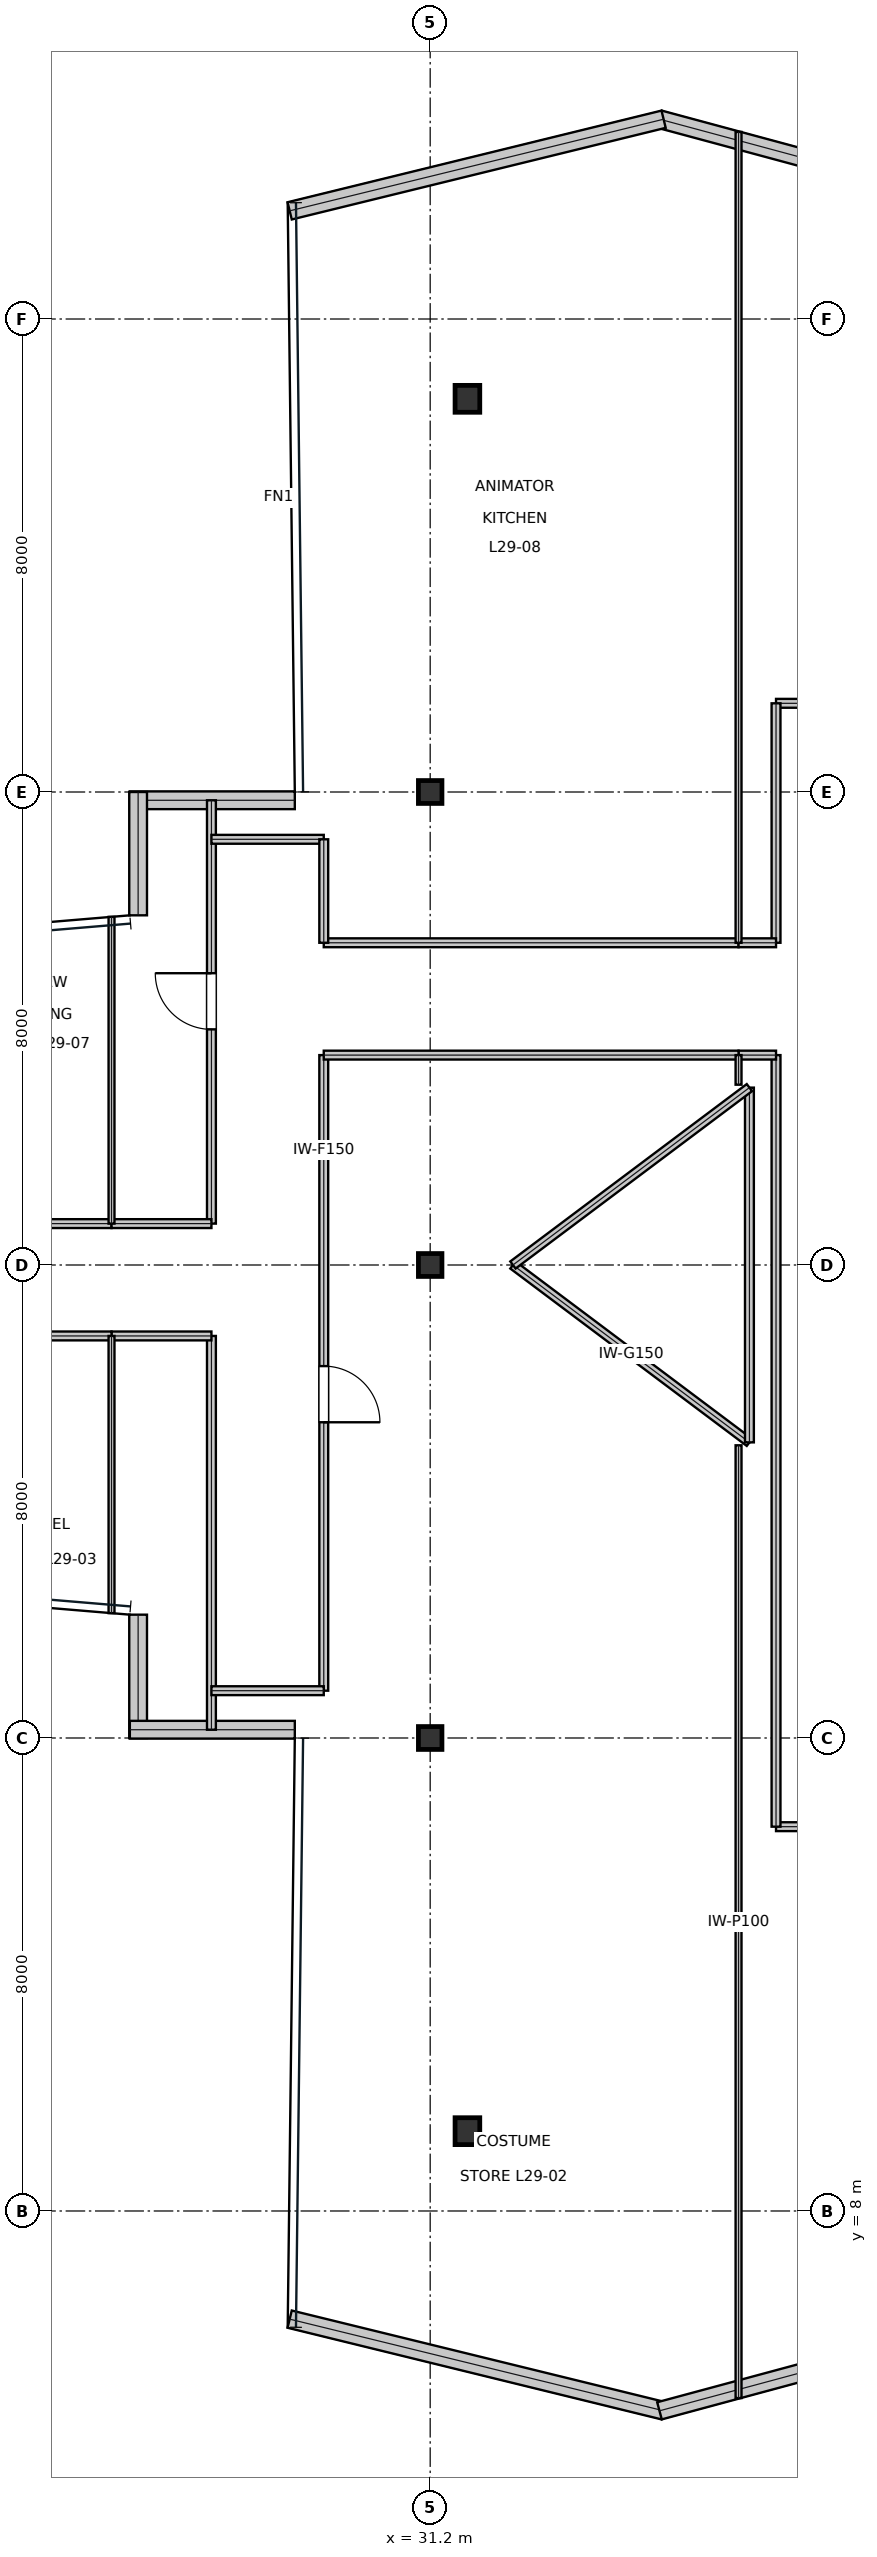
"""IFC4 building model, lengths in metres.
Left out: names, types, materials, properties, quantities, classifications, styles, units other than length and angle.
Written with IfcOpenShell. Run it as: python <this file> out.ifc"""

import sys

from ifc_helpers import new_model, si_unit, direction, frame, frame_2d, origin, origin_2d, place, context, subcontext, project, spatial, rectangle, i_section, extrude, element, fill, save


model = new_model("IFC4")
c1 = context("Model", 3, precision=1e-05, world=origin(), true_north=direction((0.0, 1.0)))
c2 = subcontext(c1, "Body", "Model", "MODEL_VIEW")
j1 = project(units=[si_unit("LENGTHUNIT", "METRE"), si_unit("PLANEANGLEUNIT", "RADIAN")], contexts=[c1])
p1 = place(None, origin())
s1 = spatial("IfcSite", under=j1, at=p1, CompositionType="ELEMENT")
p2 = place(p1, origin())
s2 = spatial("IfcBuilding", under=s1, at=p2, CompositionType="ELEMENT")
p3 = place(p2, frame((0.0, 0.0, 129.0)))
s3 = spatial("IfcBuildingStorey", under=s2, at=p3, CompositionType="ELEMENT", Elevation=129.0)
for number, where, z_axis, x_axis in (
    (1, (31.2, 16.0, 0.0), (0.0, 0.0, 1.0), (1.0, 0.0, 0.0)),
    (2, (31.2, 24.0, 0.0), (0.0, 0.0, 1.0), (1.0, 0.0, 0.0)),
    (3, (31.2, 32.0, 0.0), (0.0, 0.0, 1.0), (1.0, 0.0, 0.0)),
):
    element("IfcColumn", number, at=place(p3, frame(where, z_axis=z_axis, x_axis=x_axis)), inside=s3, PredefinedType="COLUMN", context=c2, shape_type="SweptSolid", body=[
        extrude(i_section(OverallWidth=0.398, OverallDepth=0.387, WebThickness=0.021, FlangeThickness=0.033, at=origin_2d()), origin(), (0.0, 0.0, 1.0), 4.044),
    ])
for number, where, z_axis, x_axis in (
    (4, (31.83, 38.65, 0.016), (0.0, 0.0, 1.0), (1.0, 0.0, 0.0)),
    (5, (31.83, 9.35, 0.016), (0.0, 0.0, 1.0), (1.0, 0.0, 0.0)),
):
    element("IfcColumn", number, at=place(p3, frame(where, z_axis=z_axis, x_axis=x_axis)), inside=s3, PredefinedType="COLUMN", context=c2, shape_type="SweptSolid", body=[
        extrude(i_section(OverallWidth=0.418, OverallDepth=0.455, WebThickness=0.042, FlangeThickness=0.068, at=origin_2d()), origin(), (0.0, 0.0, 1.0), 4.018),
    ])
p4 = place(p3, frame((41.404, 41.675, 0.0), z_axis=(0.0, 0.0, 1.0), x_axis=(-0.965531145086, 0.260287548434, 0.0)))
e6 = element("IfcWall", 6, at=p4, inside=s3, PredefinedType="STANDARD", context=c2, shape_type="SweptSolid", body=[
    extrude(rectangle(XDim=6.551, YDim=0.3, at=frame_2d((3.275, 0.0))), origin(), (0.0, 0.0, 1.0), 3.81),
])
p5 = place(p3, frame((35.148, 43.379, 0.0), z_axis=(0.0, 0.0, 1.0), x_axis=(-0.971267606245, -0.23798999361, 0.0)))
e7 = element("IfcWall", 7, at=p5, inside=s3, PredefinedType="STANDARD", context=c2, shape_type="SweptSolid", body=[
    extrude(rectangle(XDim=6.512, YDim=0.3, at=frame_2d((3.256, 0.0))), origin(), (0.0, 0.0, 1.0), 3.81),
])
p6 = place(p3, frame((28.91, 31.86, 0.0), z_axis=(0.0, 0.0, 1.0), x_axis=(-1.0, 0.0, 0.0)))
e8 = element("IfcWall", 8, at=p6, inside=s3, PredefinedType="STANDARD", context=c2, shape_type="SweptSolid", body=[
    extrude(rectangle(XDim=2.79, YDim=0.3, at=frame_2d((1.395, 0.0))), origin(), (0.0, 0.0, 1.0), 3.81),
])
for number, where, z_axis, x_axis in (
    (9, (26.26, 32.0, 0.0), (0.0, 0.0, 1.0), (0.0, -1.0, 0.0)),
    (10, (26.26, 18.086, 0.0), (0.0, 0.0, 1.0), (0.0, -1.0, 0.0)),
):
    element("IfcWall", number, at=place(p3, frame(where, z_axis=z_axis, x_axis=x_axis)), inside=s3, PredefinedType="STANDARD", context=c2, shape_type="SweptSolid", body=[
        extrude(rectangle(XDim=2.086, YDim=0.3, at=frame_2d((1.043, 0.0))), origin(), (0.0, 0.0, 1.0), 3.338),
    ])
p7 = place(p3, frame((26.12, 16.14, 0.0), z_axis=(0.0, 0.0, 1.0), x_axis=(1.0, 0.0, 0.0)))
e11 = element("IfcWall", 11, at=p7, inside=s3, PredefinedType="STANDARD", context=c2, shape_type="SweptSolid", body=[
    extrude(rectangle(XDim=2.79, YDim=0.3, at=frame_2d((1.395, 0.0))), origin(), (0.0, 0.0, 1.0), 3.81),
])
p8 = place(p3, frame((28.823, 6.171, 0.0), z_axis=(0.0, 0.0, 1.0), x_axis=(0.971267606245, -0.23798999361, 0.0)))
e12 = element("IfcWall", 12, at=p8, inside=s3, PredefinedType="STANDARD", context=c2, shape_type="SweptSolid", body=[
    extrude(rectangle(XDim=6.512, YDim=0.3, at=frame_2d((3.256, 0.0))), origin(), (0.0, 0.0, 1.0), 3.81),
])
p9 = place(p3, frame((35.079, 4.62, 0.0), z_axis=(0.0, 0.0, 1.0), x_axis=(0.965531145086, 0.260287548434, 0.0)))
e13 = element("IfcWall", 13, at=p9, inside=s3, PredefinedType="STANDARD", context=c2, shape_type="SweptSolid", body=[
    extrude(rectangle(XDim=6.551, YDim=0.3, at=frame_2d((3.275, 0.0))), origin(), (0.0, 0.0, 1.0), 3.81),
])
p10 = place(p3, frame((37.05, 14.5, 0.0), z_axis=(0.0, 0.0, 1.0), x_axis=(1.0, 0.0, 0.0)))
e14 = element("IfcWall", 14, at=p10, inside=s3, PredefinedType="PARTITIONING", context=c2, shape_type="SweptSolid", body=[
    extrude(rectangle(XDim=1.9, YDim=0.15, at=frame_2d((0.95, 0.0))), origin(), (0.0, 0.0, 1.0), 3.19),
])
p11 = place(p10, frame((0.475, 0.0, 0.0)))
e15 = element("IfcOpeningElement", 15, at=p11, cuts=e14, PredefinedType="OPENING", context=c2, shape_type="SweptSolid", body=[
    extrude(rectangle(XDim=0.95, YDim=2.15, at=frame_2d((0.475, 1.075))), frame((0.0, 0.085, 0.0), z_axis=(0.0, -1.0, 0.0), x_axis=(1.0, 0.0, 0.0)), (0.0, 0.0, 1.0), 0.17),
])
p12 = place(p3, frame((29.4, 16.8, 0.0), z_axis=(0.0, 0.0, 1.0), x_axis=(0.0, 1.0, 0.0)))
e16 = element("IfcWall", 16, at=p12, inside=s3, PredefinedType="PARTITIONING", context=c2, shape_type="SweptSolid", body=[
    extrude(rectangle(XDim=10.75, YDim=0.15, at=frame_2d((5.375, 0.0))), origin(), (0.0, 0.0, 1.0), 3.19),
])
p13 = place(p12, frame((4.54, 0.0, 0.0)))
e17 = element("IfcOpeningElement", 17, at=p13, cuts=e16, PredefinedType="OPENING", context=c2, shape_type="SweptSolid", body=[
    extrude(rectangle(XDim=0.95, YDim=2.15, at=frame_2d((0.475, 1.075))), frame((0.0, 0.085, 0.0), z_axis=(0.0, -1.0, 0.0), x_axis=(1.0, 0.0, 0.0)), (0.0, 0.0, 1.0), 0.17),
])
p14 = place(p3, frame((27.5, 24.7, 0.0), z_axis=(0.0, 0.0, 1.0), x_axis=(0.0, 1.0, 0.0)))
e18 = element("IfcWall", 18, at=p14, inside=s3, PredefinedType="PARTITIONING", context=c2, shape_type="SweptSolid", body=[
    extrude(rectangle(XDim=7.16, YDim=0.15, at=frame_2d((3.58, 0.0))), origin(), (0.0, 0.0, 1.0), 3.338),
])
p15 = place(p14, frame((3.285, 0.0, 0.0)))
e19 = element("IfcOpeningElement", 19, at=p15, cuts=e18, PredefinedType="OPENING", context=c2, shape_type="SweptSolid", body=[
    extrude(rectangle(XDim=0.95, YDim=2.15, at=frame_2d((0.475, 1.075))), frame((0.0, 0.085, 0.0), z_axis=(0.0, -1.0, 0.0), x_axis=(1.0, 0.0, 0.0)), (0.0, 0.0, 1.0), 0.17),
])
p16 = place(p3, frame((37.05, 33.5, 0.0), z_axis=(0.0, 0.0, 1.0), x_axis=(1.0, 0.0, 0.0)))
e20 = element("IfcWall", 20, at=p16, inside=s3, PredefinedType="PARTITIONING", context=c2, shape_type="SweptSolid", body=[
    extrude(rectangle(XDim=1.9, YDim=0.15, at=frame_2d((0.95, 0.0))), origin(), (0.0, 0.0, 1.0), 3.19),
])
p17 = place(p16, frame((0.475, 0.0, 0.0)))
e21 = element("IfcOpeningElement", 21, at=p17, cuts=e20, PredefinedType="OPENING", context=c2, shape_type="SweptSolid", body=[
    extrude(rectangle(XDim=0.95, YDim=2.15, at=frame_2d((0.475, 1.075))), frame((0.0, 0.085, 0.0), z_axis=(0.0, -1.0, 0.0), x_axis=(1.0, 0.0, 0.0)), (0.0, 0.0, 1.0), 0.17),
])
p18 = place(p3, frame((37.05, 14.5, 0.0), z_axis=(0.0, 0.0, 1.0), x_axis=(0.0, 1.0, 0.0)))
e22 = element("IfcWall", 22, at=p18, inside=s3, PredefinedType="PARTITIONING", context=c2, shape_type="SweptSolid", body=[
    extrude(rectangle(XDim=13.05, YDim=0.15, at=frame_2d((6.525, 0.0))), origin(), (0.0, 0.0, 1.0), 3.19),
])
p19 = place(p3, frame((36.416, 27.55, 0.0), z_axis=(0.0, 0.0, 1.0), x_axis=(1.0, 0.0, 0.0)))
e23 = element("IfcWall", 23, at=p19, inside=s3, PredefinedType="PARTITIONING", context=c2, shape_type="SweptSolid", body=[
    extrude(rectangle(XDim=0.634, YDim=0.15, at=frame_2d((0.317, 0.0))), origin(), (0.0, 0.0, 1.0), 3.443),
])
p20 = place(p3, frame((29.4, 27.55, 0.0), z_axis=(0.0, 0.0, 1.0), x_axis=(1.0, 0.0, 0.0)))
e24 = element("IfcWall", 24, at=p20, inside=s3, PredefinedType="PARTITIONING", context=c2, shape_type="SweptSolid", body=[
    extrude(rectangle(XDim=7.016, YDim=0.15, at=frame_2d((3.508, 0.0))), origin(), (0.0, 0.0, 1.0), 3.19),
])
p21 = place(p3, frame((27.5, 16.14, 0.0), z_axis=(0.0, 0.0, 1.0), x_axis=(0.0, 1.0, 0.0)))
e25 = element("IfcWall", 25, at=p21, inside=s3, PredefinedType="PARTITIONING", context=c2, shape_type="SweptSolid", body=[
    extrude(rectangle(XDim=6.66, YDim=0.15, at=frame_2d((3.33, 0.0))), origin(), (0.0, 0.0, 1.0), 3.338),
])
p22 = place(p3, frame((27.5, 16.8, 0.0), z_axis=(0.0, 0.0, 1.0), x_axis=(1.0, 0.0, 0.0)))
e26 = element("IfcWall", 26, at=p22, inside=s3, PredefinedType="PARTITIONING", context=c2, shape_type="SweptSolid", body=[
    extrude(rectangle(XDim=1.9, YDim=0.15, at=frame_2d((0.95, 0.0))), origin(), (0.0, 0.0, 1.0), 3.338),
])
p23 = place(p3, frame((25.81, 22.8, 0.0), z_axis=(0.0, 0.0, 1.0), x_axis=(1.0, 0.0, 0.0)))
e27 = element("IfcWall", 27, at=p23, inside=s3, PredefinedType="PARTITIONING", context=c2, shape_type="SweptSolid", body=[
    extrude(rectangle(XDim=1.69, YDim=0.15, at=frame_2d((0.845, 0.0))), origin(), (0.0, 0.0, 1.0), 3.81),
])
for number, where, z_axis, x_axis in (
    (28, (23.1, 22.8, 0.0), (0.0, 0.0, 1.0), (1.0, 0.0, 0.0)),
    (29, (23.1, 24.7, 0.0), (0.0, 0.0, 1.0), (1.0, 0.0, 0.0)),
):
    element("IfcWall", number, at=place(p3, frame(where, z_axis=z_axis, x_axis=x_axis)), inside=s3, PredefinedType="PARTITIONING", context=c2, shape_type="SweptSolid", body=[
        extrude(rectangle(XDim=2.71, YDim=0.15, at=frame_2d((1.355, 0.0))), origin(), (0.0, 0.0, 1.0), 3.19),
    ])
p24 = place(p3, frame((29.4, 29.45, 0.0), z_axis=(0.0, 0.0, 1.0), x_axis=(1.0, 0.0, 0.0)))
e30 = element("IfcWall", 30, at=p24, inside=s3, PredefinedType="PARTITIONING", context=c2, shape_type="SweptSolid", body=[
    extrude(rectangle(XDim=7.016, YDim=0.15, at=frame_2d((3.508, 0.0))), origin(), (0.0, 0.0, 1.0), 3.19),
])
p25 = place(p3, frame((27.5, 31.2, 0.0), z_axis=(0.0, 0.0, 1.0), x_axis=(1.0, 0.0, 0.0)))
e31 = element("IfcWall", 31, at=p25, inside=s3, PredefinedType="PARTITIONING", context=c2, shape_type="SweptSolid", body=[
    extrude(rectangle(XDim=1.9, YDim=0.15, at=frame_2d((0.95, 0.0))), origin(), (0.0, 0.0, 1.0), 3.338),
])
p26 = place(p3, frame((29.4, 29.45, 0.0), z_axis=(0.0, 0.0, 1.0), x_axis=(0.0, 1.0, 0.0)))
e32 = element("IfcWall", 32, at=p26, inside=s3, PredefinedType="PARTITIONING", context=c2, shape_type="SweptSolid", body=[
    extrude(rectangle(XDim=1.75, YDim=0.15, at=frame_2d((0.875, 0.0))), origin(), (0.0, 0.0, 1.0), 3.81),
])
p27 = place(p3, frame((25.81, 24.7, 0.0), z_axis=(0.0, 0.0, 1.0), x_axis=(1.0, 0.0, 0.0)))
e33 = element("IfcWall", 33, at=p27, inside=s3, PredefinedType="PARTITIONING", context=c2, shape_type="SweptSolid", body=[
    extrude(rectangle(XDim=1.69, YDim=0.15, at=frame_2d((0.845, 0.0))), origin(), (0.0, 0.0, 1.0), 3.19),
])
p28 = place(p3, frame((37.05, 29.45, 0.0), z_axis=(0.0, 0.0, 1.0), x_axis=(0.0, 1.0, 0.0)))
e34 = element("IfcWall", 34, at=p28, inside=s3, PredefinedType="PARTITIONING", context=c2, shape_type="SweptSolid", body=[
    extrude(rectangle(XDim=4.05, YDim=0.15, at=frame_2d((2.025, 0.0))), origin(), (0.0, 0.0, 1.0), 3.19),
])
p29 = place(p3, frame((36.416, 29.45, 0.0), z_axis=(0.0, 0.0, 1.0), x_axis=(1.0, 0.0, 0.0)))
e35 = element("IfcWall", 35, at=p29, inside=s3, PredefinedType="PARTITIONING", context=c2, shape_type="SweptSolid", body=[
    extrude(rectangle(XDim=0.634, YDim=0.15, at=frame_2d((0.317, 0.0))), origin(), (0.0, 0.0, 1.0), 3.81),
])
p30 = place(p3, frame((36.416, 4.836, 0.0), z_axis=(0.0, 0.0, 1.0), x_axis=(0.0, 1.0, 0.0)))
e36 = element("IfcWall", 36, at=p30, inside=s3, PredefinedType="PARTITIONING", context=c2, shape_type="SweptSolid", body=[
    extrude(rectangle(XDim=16.115, YDim=0.1, at=frame_2d((8.057, 0.0))), origin(), (0.0, 0.0, 1.0), 3.19),
])
p31 = place(p3, frame((36.416, 27.05, 0.0), z_axis=(0.0, 0.0, 1.0), x_axis=(0.0, 1.0, 0.0)))
e37 = element("IfcWall", 37, at=p31, inside=s3, PredefinedType="PARTITIONING", context=c2, shape_type="SweptSolid", body=[
    extrude(rectangle(XDim=0.5, YDim=0.1, at=frame_2d((0.25, 0.0))), origin(), (0.0, 0.0, 1.0), 3.81),
])
p32 = place(p3, frame((25.81, 18.112, 0.0), z_axis=(0.0, 0.0, 1.0), x_axis=(0.0, 1.0, 0.0)))
e38 = element("IfcWall", 38, at=p32, inside=s3, PredefinedType="PARTITIONING", context=c2, shape_type="SweptSolid", body=[
    extrude(rectangle(XDim=4.688, YDim=0.1, at=frame_2d((2.344, 0.0))), origin(), (0.0, 0.0, 1.0), 3.81),
])
p33 = place(p3, frame((25.81, 24.7, 0.0), z_axis=(0.0, 0.0, 1.0), x_axis=(0.0, 1.0, 0.0)))
e39 = element("IfcWall", 39, at=p33, inside=s3, PredefinedType="PARTITIONING", context=c2, shape_type="SweptSolid", body=[
    extrude(rectangle(XDim=5.188, YDim=0.1, at=frame_2d((2.594, 0.0))), origin(), (0.0, 0.0, 1.0), 3.19),
])
p34 = place(p3, frame((36.416, 29.45, 0.0), z_axis=(0.0, 0.0, 1.0), x_axis=(0.0, 1.0, 0.0)))
e40 = element("IfcWall", 40, at=p34, inside=s3, PredefinedType="PARTITIONING", context=c2, shape_type="SweptSolid", body=[
    extrude(rectangle(XDim=13.714, YDim=0.1, at=frame_2d((6.857, 0.0))), origin(), (0.0, 0.0, 1.0), 3.19),
])
p35 = place(p3, frame((32.6, 24.0, 0.0), z_axis=(0.0, 0.0, 1.0), x_axis=(0.8, -0.6, 0.0)))
e41 = element("IfcWall", 41, at=p35, inside=s3, PredefinedType="MOVABLE", context=c2, shape_type="SweptSolid", body=[
    extrude(rectangle(XDim=5.0, YDim=0.15, at=frame_2d((2.5, 0.0))), origin(), (0.0, 0.0, 1.0), 3.81),
])
p36 = place(p3, frame((36.6, 21.0, 0.0), z_axis=(0.0, 0.0, 1.0), x_axis=(0.0, 1.0, 0.0)))
e42 = element("IfcWall", 42, at=p36, inside=s3, PredefinedType="MOVABLE", context=c2, shape_type="SweptSolid", body=[
    extrude(rectangle(XDim=6.0, YDim=0.15, at=frame_2d((3.0, 0.0))), origin(), (0.0, 0.0, 1.0), 3.81),
])
p37 = place(p3, frame((36.6, 27.0, 0.0), z_axis=(0.0, 0.0, 1.0), x_axis=(-0.8, -0.6, 0.0)))
e43 = element("IfcWall", 43, at=p37, inside=s3, PredefinedType="MOVABLE", context=c2, shape_type="SweptSolid", body=[
    extrude(rectangle(XDim=5.0, YDim=0.15, at=frame_2d((2.5, 0.0))), origin(), (0.0, 0.0, 1.0), 3.81),
])
p38 = place(p13, frame((0.95, 0.0, 0.0), z_axis=(0.0, 0.0, 1.0), x_axis=(-1.0, 0.0, 0.0)))
e44 = element("IfcDoor", 44, at=p38, inside=s3, OperationType="SINGLE_SWING_RIGHT", PredefinedType="DOOR", context=c2, shape_type="SweptSolid", body=[
    extrude(rectangle(XDim=0.95, YDim=2.15, at=frame_2d((0.475, 1.075))), frame((0.0, 0.025, 0.0), z_axis=(0.0, -1.0, 0.0), x_axis=(1.0, 0.0, 0.0)), (0.0, 0.0, 1.0), 0.05),
])
fill(e17, e44)
p39 = place(p15, origin())
e45 = element("IfcDoor", 45, at=p39, inside=s3, OperationType="SINGLE_SWING_RIGHT", PredefinedType="DOOR", context=c2, shape_type="SweptSolid", body=[
    extrude(rectangle(XDim=0.95, YDim=2.15, at=frame_2d((0.475, 1.075))), frame((0.0, 0.025, 0.0), z_axis=(0.0, -1.0, 0.0), x_axis=(1.0, 0.0, 0.0)), (0.0, 0.0, 1.0), 0.05),
])
fill(e19, e45)
save(model, sys.argv[1])
